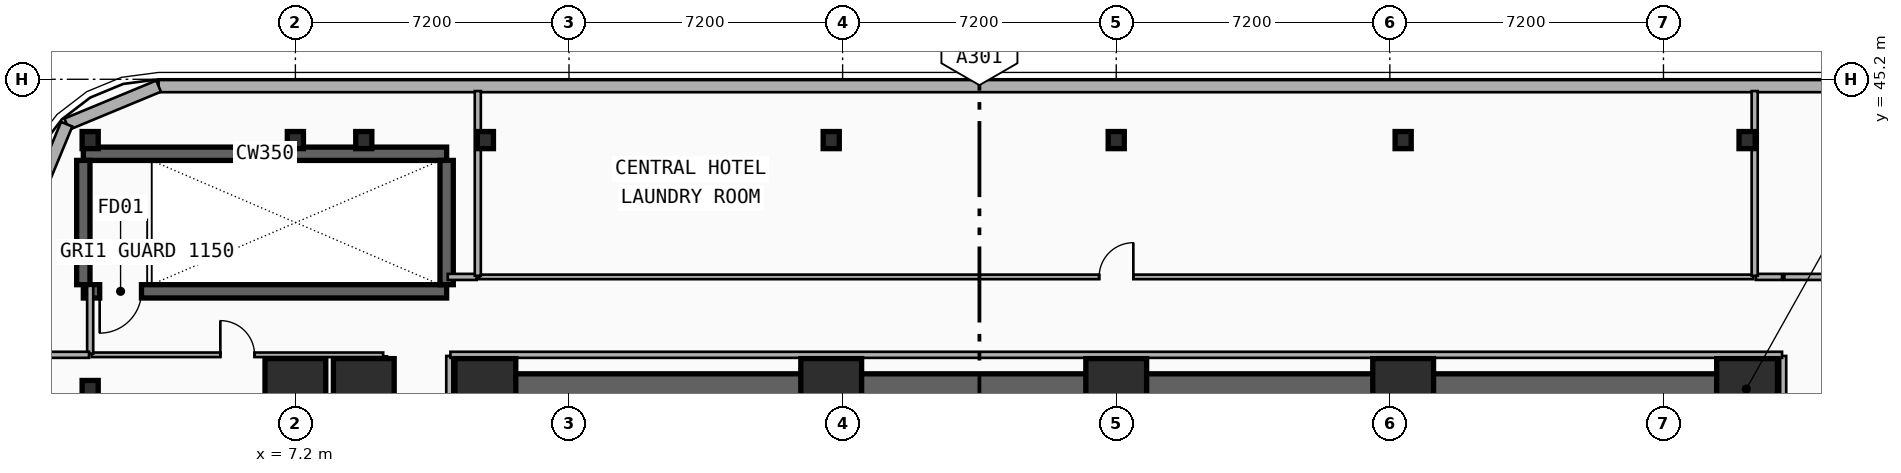
"""IFC4 building model, lengths in metres.
Left out: names, types, materials, properties, quantities, classifications, styles, units other than length and angle.
Written with IfcOpenShell. Run it as: python <this file> out.ifc"""

import sys

from ifc_helpers import new_model, si_unit, direction, frame, frame_2d, origin, origin_2d, place, context, subcontext, project, spatial, rectangle, i_section, extrude, element, fill, save


model = new_model("IFC4")
c1 = context("Model", 3, precision=1e-05, world=origin(), true_north=direction((0.0, 1.0)))
c2 = subcontext(c1, "Body", "Model", "MODEL_VIEW")
j1 = project(units=[si_unit("LENGTHUNIT", "METRE"), si_unit("PLANEANGLEUNIT", "RADIAN")], contexts=[c1])
p1 = place(None, origin())
s1 = spatial("IfcSite", under=j1, at=p1, CompositionType="ELEMENT")
p2 = place(p1, origin())
s2 = spatial("IfcBuilding", under=s1, at=p2, CompositionType="ELEMENT")
p3 = place(p2, frame((0.0, 0.0, 24.2)))
s3 = spatial("IfcBuildingStorey", under=s2, at=p3, CompositionType="ELEMENT", Elevation=24.2)
p4 = place(p3, frame((12.15, 37.05, 0.0), z_axis=(0.0, 0.0, 1.0), x_axis=(1.0, 0.0, 0.0)))
e1 = element("IfcWall", 1, at=p4, inside=s3, PredefinedType="SHEAR", context=c2, shape_type="SweptSolid", body=[
    extrude(rectangle(XDim=33.23, YDim=0.8, at=frame_2d((16.615, 0.0))), origin(), (0.0, 0.0, 1.0), 4.8),
])
p5 = place(p3, frame((1.62, 43.24, 0.0), z_axis=(0.0, 0.0, 1.0), x_axis=(1.0, 0.0, 0.0)))
e2 = element("IfcWall", 2, at=p5, inside=s3, PredefinedType="SHEAR", context=c2, shape_type="SweptSolid", body=[
    extrude(rectangle(XDim=9.56, YDim=0.35, at=frame_2d((4.78, 0.0))), origin(), (0.0, 0.0, 1.0), 4.8),
])
p6 = place(p3, frame((11.18, 39.62, 0.0), z_axis=(0.0, 0.0, 1.0), x_axis=(-1.0, 0.0, 0.0)))
e3 = element("IfcWall", 3, at=p6, inside=s3, PredefinedType="SHEAR", context=c2, shape_type="SweptSolid", body=[
    extrude(rectangle(XDim=9.56, YDim=0.35, at=frame_2d((4.78, 0.0))), origin(), (0.0, 0.0, 1.0), 4.8),
])
p7 = place(p6, frame((8.03, 0.0, 0.0)))
e4 = element("IfcOpeningElement", 4, at=p7, cuts=e3, PredefinedType="OPENING", context=c2, shape_type="SweptSolid", body=[
    extrude(rectangle(XDim=1.1, YDim=2.15, at=frame_2d((0.55, 1.075))), frame((0.0, 0.185, 0.0), z_axis=(0.0, -1.0, 0.0), x_axis=(1.0, 0.0, 0.0)), (0.0, 0.0, 1.0), 0.37),
])
for number, where, z_axis, x_axis in (
    (5, (1.62, 39.795, 0.0), (0.0, 0.0, 1.0), (0.0, 1.0, 0.0)),
    (6, (11.18, 39.795, 0.0), (0.0, 0.0, 1.0), (0.0, 1.0, 0.0)),
):
    element("IfcWall", number, at=place(p3, frame(where, z_axis=z_axis, x_axis=x_axis)), inside=s3, PredefinedType="SHEAR", context=c2, shape_type="SweptSolid", body=[
        extrude(rectangle(XDim=3.27, YDim=0.35, at=frame_2d((1.635, 0.0))), origin(), (0.0, 0.0, 1.0), 4.8),
    ])
for number, where, z_axis, x_axis in (
    (7, (12.2, 37.05, 0.0), (0.0, 0.0, 1.0), (1.0, 0.0, 0.0)),
    (8, (21.3, 37.05, 0.0), (0.0, 0.0, 1.0), (1.0, 0.0, 0.0)),
    (9, (28.8, 37.05, 0.0), (0.0, 0.0, 1.0), (1.0, 0.0, 0.0)),
    (10, (36.35, 37.05, 0.0), (0.0, 0.0, 1.0), (1.0, 0.0, 0.0)),
    (11, (45.4, 37.05, 0.0), (0.0, 0.0, 1.0), (1.0, 0.0, 0.0)),
):
    element("IfcColumn", number, at=place(p3, frame(where, z_axis=z_axis, x_axis=x_axis)), inside=s3, PredefinedType="COLUMN", context=c2, shape_type="SweptSolid", body=[
        extrude(rectangle(XDim=1.6, YDim=1.6, at=origin_2d()), origin(), (0.0, 0.0, 1.0), 4.8),
    ])
for number, where, z_axis, x_axis in (
    (12, (1.8, 37.05, 0.0), (0.0, 0.0, 1.0), (1.0, 0.0, 0.0)),
    (13, (1.8, 43.6, 0.0), (0.0, 0.0, 1.0), (1.0, 0.0, 0.0)),
):
    element("IfcColumn", number, at=place(p3, frame(where, z_axis=z_axis, x_axis=x_axis)), inside=s3, PredefinedType="COLUMN", context=c2, shape_type="SweptSolid", body=[
        extrude(i_section(OverallWidth=0.424, OverallDepth=0.45, WebThickness=0.041, FlangeThickness=0.065, FilletRadius=0.015, at=origin_2d()), origin(), (0.0, 0.0, 1.0), 4.8),
    ])
p8 = place(p3, frame((7.2, 37.05, 0.0), z_axis=(0.0, 0.0, 1.0), x_axis=(1.0, 0.0, 0.0)))
e14 = element("IfcColumn", 14, at=p8, inside=s3, PredefinedType="COLUMN", context=c2, shape_type="SweptSolid", body=[
    extrude(rectangle(XDim=1.6, YDim=1.6, at=origin_2d()), origin(), (0.0, 0.0, 1.0), 4.8),
])
p9 = place(p3, frame((7.2, 43.6, 0.0), z_axis=(0.0, 0.0, 1.0), x_axis=(1.0, 0.0, 0.0)))
e15 = element("IfcColumn", 15, at=p9, inside=s3, PredefinedType="COLUMN", context=c2, shape_type="SweptSolid", body=[
    extrude(i_section(OverallWidth=0.424, OverallDepth=0.45, WebThickness=0.041, FlangeThickness=0.065, FilletRadius=0.015, at=origin_2d()), origin(), (0.0, 0.0, 1.0), 4.8),
])
p10 = place(p3, frame((9.0, 37.05, 0.0), z_axis=(0.0, 0.0, 1.0), x_axis=(1.0, 0.0, 0.0)))
e16 = element("IfcColumn", 16, at=p10, inside=s3, PredefinedType="COLUMN", context=c2, shape_type="SweptSolid", body=[
    extrude(rectangle(XDim=1.6, YDim=1.6, at=origin_2d()), origin(), (0.0, 0.0, 1.0), 4.8),
])
for number, where, z_axis, x_axis in (
    (17, (9.0, 43.6, 0.0), (0.0, 0.0, 1.0), (1.0, 0.0, 0.0)),
    (18, (12.2, 43.6, 0.0), (0.0, 0.0, 1.0), (1.0, 0.0, 0.0)),
    (19, (21.3, 43.6, 0.0), (0.0, 0.0, 1.0), (1.0, 0.0, 0.0)),
    (20, (28.8, 43.6, 0.0), (0.0, 0.0, 1.0), (1.0, 0.0, 0.0)),
    (21, (36.35, 43.6, 0.0), (0.0, 0.0, 1.0), (1.0, 0.0, 0.0)),
    (22, (45.4, 43.6, 0.0), (0.0, 0.0, 1.0), (1.0, 0.0, 0.0)),
):
    element("IfcColumn", number, at=place(p3, frame(where, z_axis=z_axis, x_axis=x_axis)), inside=s3, PredefinedType="COLUMN", context=c2, shape_type="SweptSolid", body=[
        extrude(i_section(OverallWidth=0.424, OverallDepth=0.45, WebThickness=0.041, FlangeThickness=0.065, FilletRadius=0.015, at=origin_2d()), origin(), (0.0, 0.0, 1.0), 4.8),
    ])
p11 = place(p3, frame((3.6, 45.02, 0.0), z_axis=(0.0, 0.0, 1.0), x_axis=(1.0, 0.0, 0.0)))
e23 = element("IfcWall", 23, at=p11, inside=s3, PredefinedType="SOLIDWALL", context=c2, shape_type="SweptSolid", body=[
    extrude(rectangle(XDim=50.4, YDim=0.32, at=frame_2d((25.2, 0.0))), origin(), (0.0, 0.0, 1.0), 4.48),
])
p12 = place(p3, frame((1.182, 44.018, 0.0), z_axis=(0.0, 0.0, 1.0), x_axis=(0.923886112352, 0.382667546838, 0.0)))
e24 = element("IfcWall", 24, at=p12, inside=s3, PredefinedType="SOLIDWALL", context=c2, shape_type="SweptSolid", body=[
    extrude(rectangle(XDim=2.618, YDim=0.32, at=frame_2d((1.309, 0.0))), origin(), (0.0, 0.0, 1.0), 4.48),
])
p13 = place(p3, frame((0.18, 41.6, 0.0), z_axis=(0.0, 0.0, 1.0), x_axis=(0.382700522567, 0.923872453333, 0.0)))
e25 = element("IfcWall", 25, at=p13, inside=s3, PredefinedType="SOLIDWALL", context=c2, shape_type="SweptSolid", body=[
    extrude(rectangle(XDim=2.617, YDim=0.32, at=frame_2d((1.309, 0.0))), origin(), (0.0, 0.0, 1.0), 4.48),
])
p14 = place(p3, frame((9.55, 27.64, 0.0), z_axis=(0.0, 0.0, 1.0), x_axis=(0.0, 1.0, 0.0)))
e26 = element("IfcWall", 26, at=p14, inside=s3, PredefinedType="PARTITIONING", context=c2, shape_type="SweptSolid", body=[
    extrude(rectangle(XDim=10.27, YDim=0.12, at=frame_2d((5.135, 0.0))), origin(), (0.0, 0.0, 1.0), 4.48),
])
p15 = place(p14, frame((4.685, 0.0, 0.0)))
e27 = element("IfcOpeningElement", 27, at=p15, cuts=e26, PredefinedType="OPENING", context=c2, shape_type="SweptSolid", body=[
    extrude(rectangle(XDim=0.9, YDim=2.1, at=frame_2d((0.45, 1.05))), frame((0.0, 0.07, 0.0), z_axis=(0.0, -1.0, 0.0), x_axis=(1.0, 0.0, 0.0)), (0.0, 0.0, 1.0), 0.14),
])
p16 = place(p3, frame((1.84, 37.95, 0.0), z_axis=(0.0, 0.0, 1.0), x_axis=(1.0, 0.0, 0.0)))
e28 = element("IfcWall", 28, at=p16, inside=s3, PredefinedType="PARTITIONING", context=c2, shape_type="SweptSolid", body=[
    extrude(rectangle(XDim=7.67, YDim=0.12, at=frame_2d((3.835, 0.0))), origin(), (0.0, 0.0, 1.0), 4.48),
])
p17 = place(p16, frame((3.385, 0.0, 0.0)))
e29 = element("IfcOpeningElement", 29, at=p17, cuts=e28, PredefinedType="OPENING", context=c2, shape_type="SweptSolid", body=[
    extrude(rectangle(XDim=0.9, YDim=2.1, at=frame_2d((0.45, 1.05))), frame((0.0, 0.07, 0.0), z_axis=(0.0, -1.0, 0.0), x_axis=(1.0, 0.0, 0.0)), (0.0, 0.0, 1.0), 0.14),
])
p18 = place(p3, frame((12.04, 40.0, 0.0), z_axis=(0.0, 0.0, 1.0), x_axis=(1.0, 0.0, 0.0)))
e30 = element("IfcWall", 30, at=p18, inside=s3, PredefinedType="PARTITIONING", context=c2, shape_type="SweptSolid", body=[
    extrude(rectangle(XDim=33.52, YDim=0.12, at=frame_2d((16.76, 0.0))), origin(), (0.0, 0.0, 1.0), 3.81),
])
p19 = place(p18, frame((16.31, 0.0, 0.0)))
e31 = element("IfcOpeningElement", 31, at=p19, cuts=e30, PredefinedType="OPENING", context=c2, shape_type="SweptSolid", body=[
    extrude(rectangle(XDim=0.9, YDim=2.1, at=frame_2d((0.45, 1.05))), frame((0.0, 0.07, 0.0), z_axis=(0.0, -1.0, 0.0), x_axis=(1.0, 0.0, 0.0)), (0.0, 0.0, 1.0), 0.14),
])
p20 = place(p3, frame((11.25, 27.63, 0.0), z_axis=(0.0, 0.0, 1.0), x_axis=(0.0, 1.0, 0.0)))
e32 = element("IfcWall", 32, at=p20, inside=s3, PredefinedType="PARTITIONING", context=c2, shape_type="SweptSolid", body=[
    extrude(rectangle(XDim=10.29, YDim=0.16, at=frame_2d((5.145, 0.0))), origin(), (0.0, 0.0, 1.0), 4.48),
])
p21 = place(p3, frame((46.38, 40.0, 0.0), z_axis=(0.0, 0.0, 1.0), x_axis=(1.0, 0.0, 0.0)))
e33 = element("IfcWall", 33, at=p21, inside=s3, PredefinedType="PARTITIONING", context=c2, shape_type="SweptSolid", body=[
    extrude(rectangle(XDim=1.64, YDim=0.16, at=frame_2d((0.82, 0.0))), origin(), (0.0, 0.0, 1.0), 4.48),
])
p22 = place(p3, frame((46.35, 27.63, 0.0), z_axis=(0.0, 0.0, 1.0), x_axis=(0.0, 1.0, 0.0)))
e34 = element("IfcWall", 34, at=p22, inside=s3, PredefinedType="PARTITIONING", context=c2, shape_type="SweptSolid", body=[
    extrude(rectangle(XDim=10.29, YDim=0.16, at=frame_2d((5.145, 0.0))), origin(), (0.0, 0.0, 1.0), 4.48),
])
p23 = place(p3, frame((11.28, 37.95, 0.0), z_axis=(0.0, 0.0, 1.0), x_axis=(1.0, 0.0, 0.0)))
e35 = element("IfcWall", 35, at=p23, inside=s3, PredefinedType="PARTITIONING", context=c2, shape_type="SweptSolid", body=[
    extrude(rectangle(XDim=35.04, YDim=0.16, at=frame_2d((17.52, 0.0))), origin(), (0.0, 0.0, 1.0), 3.81),
])
p24 = place(p3, frame((11.21, 40.0, 0.0), z_axis=(0.0, 0.0, 1.0), x_axis=(1.0, 0.0, 0.0)))
e36 = element("IfcWall", 36, at=p24, inside=s3, PredefinedType="PARTITIONING", context=c2, shape_type="SweptSolid", body=[
    extrude(rectangle(XDim=0.76, YDim=0.16, at=frame_2d((0.38, 0.0))), origin(), (0.0, 0.0, 1.0), 3.81),
])
p25 = place(p3, frame((45.63, 40.0, 0.0), z_axis=(0.0, 0.0, 1.0), x_axis=(1.0, 0.0, 0.0)))
e37 = element("IfcWall", 37, at=p25, inside=s3, PredefinedType="PARTITIONING", context=c2, shape_type="SweptSolid", body=[
    extrude(rectangle(XDim=0.69, YDim=0.16, at=frame_2d((0.345, 0.0))), origin(), (0.0, 0.0, 1.0), 3.81),
])
p26 = place(p3, frame((1.8, 37.98, 0.0), z_axis=(0.0, 0.0, 1.0), x_axis=(0.0, 1.0, 0.0)))
e38 = element("IfcWall", 38, at=p26, inside=s3, PredefinedType="PARTITIONING", context=c2, shape_type="SweptSolid", body=[
    extrude(rectangle(XDim=1.785, YDim=0.16, at=frame_2d((0.893, 0.0))), origin(), (0.0, 0.0, 1.0), 4.48),
])
p27 = place(p3, frame((0.31, 37.95, 0.0), z_axis=(0.0, 0.0, 1.0), x_axis=(1.0, 0.0, 0.0)))
e39 = element("IfcWall", 39, at=p27, inside=s3, PredefinedType="PARTITIONING", context=c2, shape_type="SweptSolid", body=[
    extrude(rectangle(XDim=1.46, YDim=0.16, at=frame_2d((0.73, 0.0))), origin(), (0.0, 0.0, 1.0), 4.48),
])
for number, where, z_axis, x_axis in (
    (40, (12.0, 40.03, 0.0), (0.0, 0.0, 1.0), (0.0, 1.0, 0.0)),
    (41, (45.6, 40.03, 0.0), (0.0, 0.0, 1.0), (0.0, 1.0, 0.0)),
):
    element("IfcWall", number, at=place(p3, frame(where, z_axis=z_axis, x_axis=x_axis)), inside=s3, PredefinedType="PARTITIONING", context=c2, shape_type="SweptSolid", body=[
        extrude(rectangle(XDim=4.86, YDim=0.16, at=frame_2d((2.43, 0.0))), origin(), (0.0, 0.0, 1.0), 3.81),
    ])
p28 = place(p7, origin())
e42 = element("IfcDoor", 42, at=p28, inside=s3, OperationType="SINGLE_SWING_RIGHT", PredefinedType="DOOR", context=c2, shape_type="SweptSolid", body=[
    extrude(rectangle(XDim=1.1, YDim=2.15, at=frame_2d((0.55, 1.075))), frame((0.0, 0.025, 0.0), z_axis=(0.0, -1.0, 0.0), x_axis=(1.0, 0.0, 0.0)), (0.0, 0.0, 1.0), 0.05),
])
fill(e4, e42)
p29 = place(p17, origin())
e43 = element("IfcDoor", 43, at=p29, inside=s3, OperationType="SINGLE_SWING_LEFT", PredefinedType="DOOR", context=c2, shape_type="SweptSolid", body=[
    extrude(rectangle(XDim=0.9, YDim=2.1, at=frame_2d((0.45, 1.05))), frame((0.0, 0.025, 0.0), z_axis=(0.0, -1.0, 0.0), x_axis=(1.0, 0.0, 0.0)), (0.0, 0.0, 1.0), 0.05),
])
fill(e29, e43)
p30 = place(p19, origin())
e44 = element("IfcDoor", 44, at=p30, inside=s3, OperationType="SINGLE_SWING_RIGHT", PredefinedType="DOOR", context=c2, shape_type="SweptSolid", body=[
    extrude(rectangle(XDim=0.9, YDim=2.1, at=frame_2d((0.45, 1.05))), frame((0.0, 0.025, 0.0), z_axis=(0.0, -1.0, 0.0), x_axis=(1.0, 0.0, 0.0)), (0.0, 0.0, 1.0), 0.05),
])
fill(e31, e44)
save(model, sys.argv[1])
